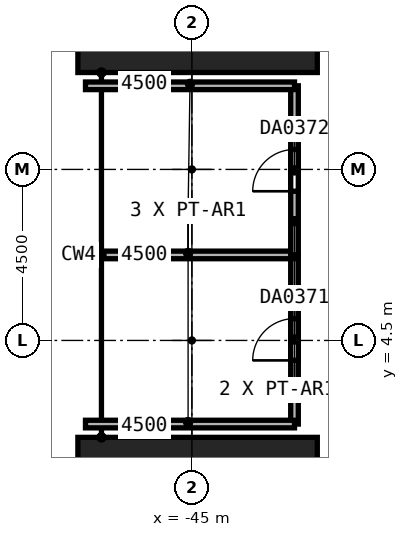
"""IFC4 building model, lengths in metres.
Left out: names, types, materials, properties, quantities, classifications, styles, units other than length and angle.
Written with IfcOpenShell. Run it as: python <this file> out.ifc"""

import sys

from ifc_helpers import new_model, si_unit, direction, frame, frame_2d, origin, origin_2d, place, context, subcontext, project, spatial, rectangle, extrude, element, fill, save


model = new_model("IFC4")
c1 = context("Model", 3, precision=1e-05, world=origin(), true_north=direction((0.0, 1.0)))
c2 = subcontext(c1, "Body", "Model", "MODEL_VIEW")
j1 = project(units=[si_unit("LENGTHUNIT", "METRE"), si_unit("PLANEANGLEUNIT", "RADIAN")], contexts=[c1])
p1 = place(None, origin())
s1 = spatial("IfcSite", under=j1, at=p1, CompositionType="ELEMENT")
p2 = place(p1, origin())
s2 = spatial("IfcBuilding", under=s1, at=p2, CompositionType="ELEMENT")
p3 = place(p2, frame((0.0, 0.0, 19.0)))
s3 = spatial("IfcBuildingStorey", under=s2, at=p3, CompositionType="ELEMENT", Elevation=19.0)
for number, where, z_axis, x_axis in (
    (1, (-44.85, 0.0, 0.0), (0.0, 0.0, 1.0), (0.0, 1.0, 0.0)),
    (2, (-44.85, 13.5, 0.0), (0.0, 0.0, 1.0), (0.0, 1.0, 0.0)),
):
    element("IfcColumn", number, at=place(p3, frame(where, z_axis=z_axis, x_axis=x_axis)), inside=s3, PredefinedType="COLUMN", context=c2, shape_type="SweptSolid", body=[
        extrude(rectangle(XDim=3.9, YDim=6.3, at=origin_2d()), origin(), (0.0, 0.0, 1.0), 6.0),
    ])
p4 = place(p3, frame((-42.3, 2.3, 0.0), z_axis=(0.0, 0.0, 1.0), x_axis=(0.0, 1.0, 0.0)))
e3 = element("IfcWall", 3, at=p4, inside=s3, PredefinedType="PARTITIONING", context=c2, shape_type="SweptSolid", body=[
    extrude(rectangle(XDim=4.45, YDim=0.2, at=frame_2d((2.225, 0.0))), origin(), (0.0, 0.0, 1.0), 4.5),
])
p5 = place(p4, frame((1.675, 0.0, 0.0)))
e4 = element("IfcOpeningElement", 4, at=p5, cuts=e3, PredefinedType="OPENING", context=c2, shape_type="SweptSolid", body=[
    extrude(rectangle(XDim=1.1, YDim=2.4, at=frame_2d((0.55, 1.2))), frame((0.0, 0.1, 0.0), z_axis=(0.0, -1.0, 0.0), x_axis=(1.0, 0.0, 0.0)), (0.0, 0.0, 1.0), 0.2),
])
for number, where, z_axis, x_axis in (
    (5, (-42.3, 2.3, 0.0), (0.0, 0.0, 1.0), (-1.0, 0.0, 0.0)),
    (6, (-47.8, 6.75, 0.0), (0.0, 0.0, 1.0), (1.0, 0.0, 0.0)),
):
    element("IfcWall", number, at=place(p3, frame(where, z_axis=z_axis, x_axis=x_axis)), inside=s3, PredefinedType="PARTITIONING", context=c2, shape_type="SweptSolid", body=[
        extrude(rectangle(XDim=5.5, YDim=0.2, at=frame_2d((2.75, 0.0))), origin(), (0.0, 0.0, 1.0), 5.7),
    ])
p6 = place(p3, frame((-42.3, 6.75, 0.0), z_axis=(0.0, 0.0, 1.0), x_axis=(0.0, 1.0, 0.0)))
e7 = element("IfcWall", 7, at=p6, inside=s3, PredefinedType="PARTITIONING", context=c2, shape_type="SweptSolid", body=[
    extrude(rectangle(XDim=4.45, YDim=0.2, at=frame_2d((2.225, 0.0))), origin(), (0.0, 0.0, 1.0), 4.5),
])
p7 = place(p6, frame((1.675, 0.0, 0.0)))
e8 = element("IfcOpeningElement", 8, at=p7, cuts=e7, PredefinedType="OPENING", context=c2, shape_type="SweptSolid", body=[
    extrude(rectangle(XDim=1.1, YDim=2.4, at=frame_2d((0.55, 1.2))), frame((0.0, 0.1, 0.0), z_axis=(0.0, -1.0, 0.0), x_axis=(1.0, 0.0, 0.0)), (0.0, 0.0, 1.0), 0.2),
])
p8 = place(p3, frame((-42.3, 11.2, 0.0), z_axis=(0.0, 0.0, 1.0), x_axis=(-1.0, 0.0, 0.0)))
e9 = element("IfcWall", 9, at=p8, inside=s3, PredefinedType="PARTITIONING", context=c2, shape_type="SweptSolid", body=[
    extrude(rectangle(XDim=5.5, YDim=0.2, at=frame_2d((2.75, 0.0))), origin(), (0.0, 0.0, 1.0), 5.7),
])
p9 = place(p5, origin())
e10 = element("IfcDoor", 10, at=p9, inside=s3, OperationType="DOUBLE_DOOR_SINGLE_SWING", PredefinedType="DOOR", context=c2, shape_type="SweptSolid", body=[
    extrude(rectangle(XDim=1.1, YDim=2.4, at=frame_2d((0.55, 1.2))), frame((0.0, 0.025, 0.0), z_axis=(0.0, -1.0, 0.0), x_axis=(1.0, 0.0, 0.0)), (0.0, 0.0, 1.0), 0.05),
])
fill(e4, e10)
p10 = place(p7, origin())
e11 = element("IfcDoor", 11, at=p10, inside=s3, OperationType="DOUBLE_DOOR_SINGLE_SWING", PredefinedType="DOOR", context=c2, shape_type="SweptSolid", body=[
    extrude(rectangle(XDim=1.1, YDim=2.4, at=frame_2d((0.55, 1.2))), frame((0.0, 0.025, 0.0), z_axis=(0.0, -1.0, 0.0), x_axis=(1.0, 0.0, 0.0)), (0.0, 0.0, 1.0), 0.05),
])
fill(e8, e11)
save(model, sys.argv[1])
